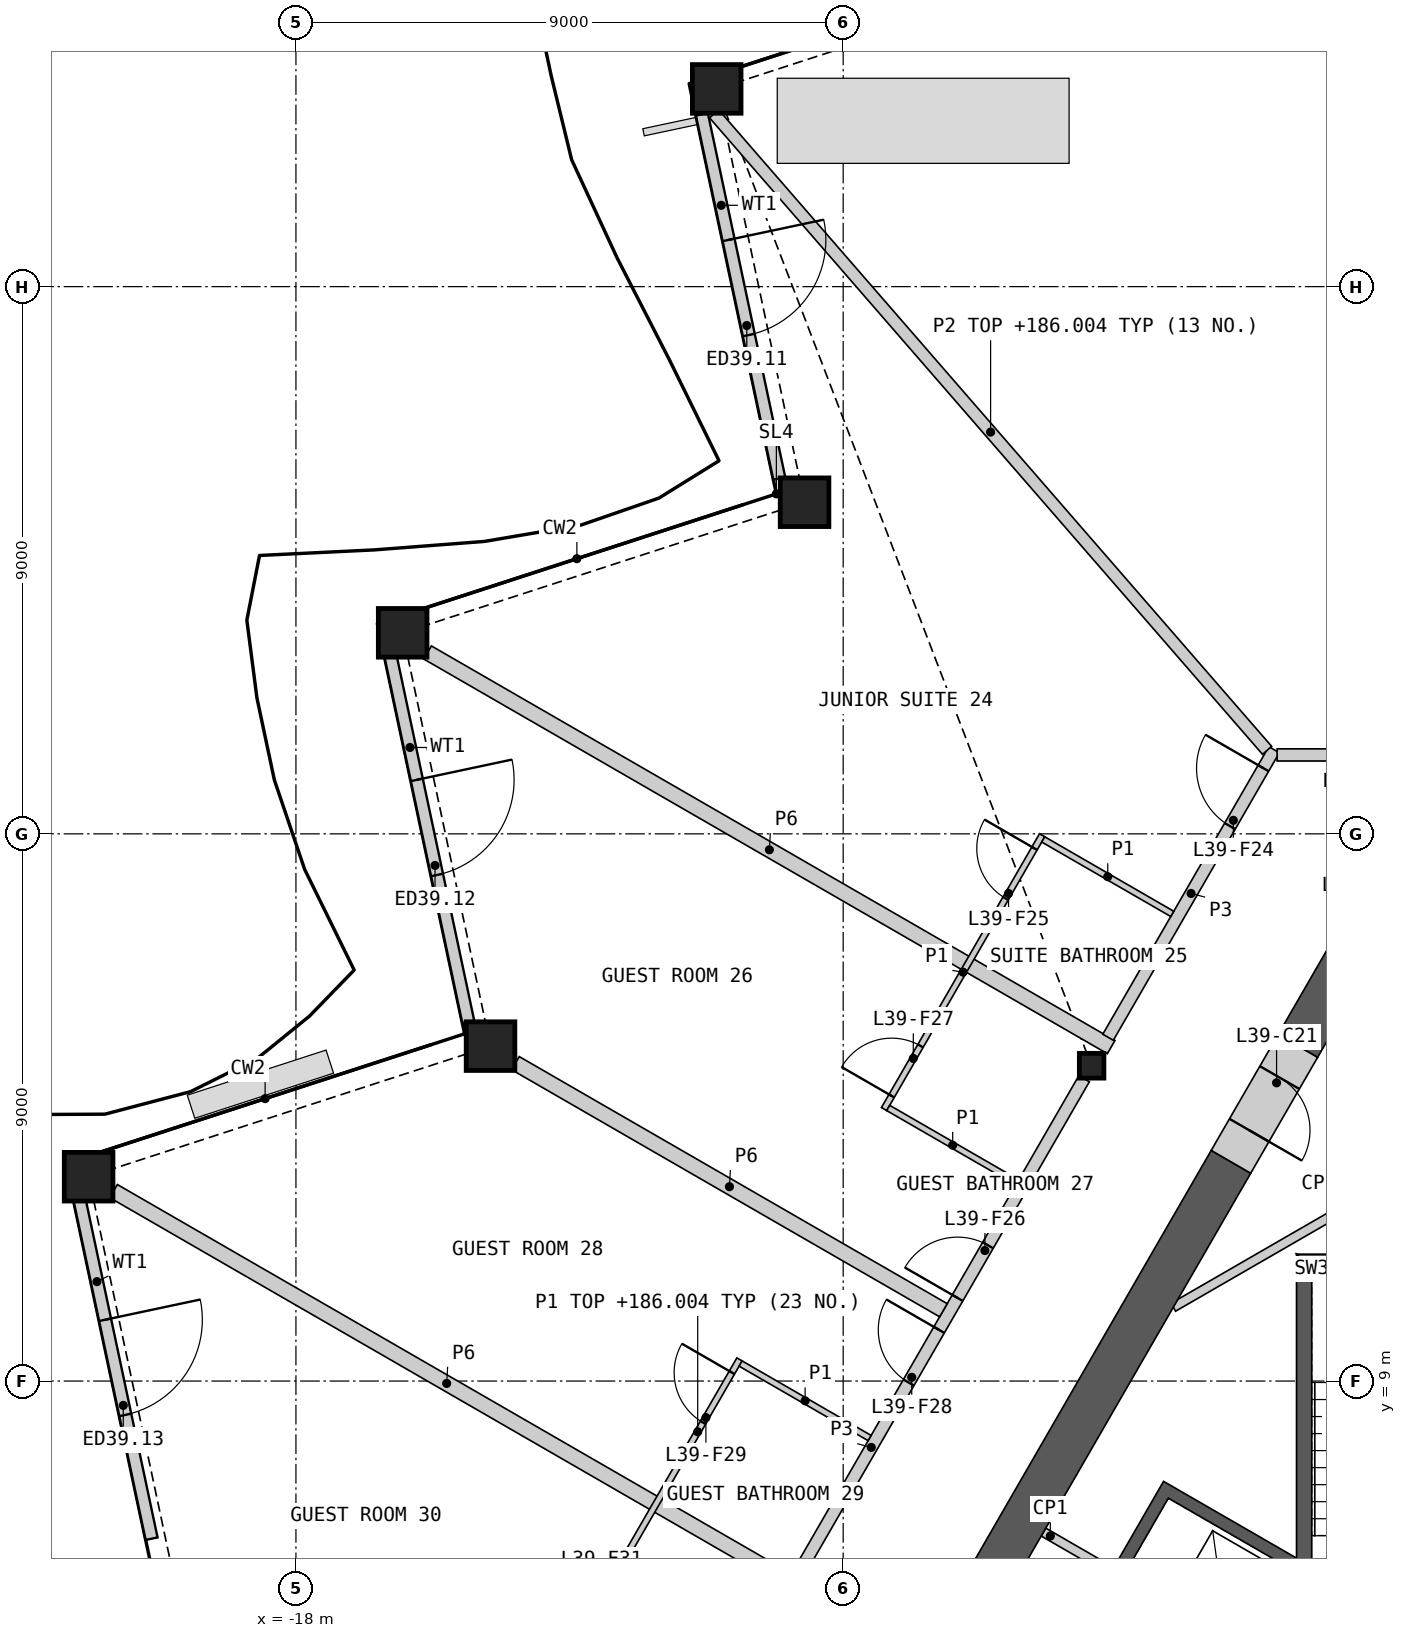
"""IFC4 building model, lengths in metres.
Left out: names, types, materials, properties, quantities, classifications, styles, units other than length and angle.
Written with IfcOpenShell. Run it as: python <this file> out.ifc"""

import sys

from ifc_helpers import new_model, si_unit, direction, frame, frame_2d, origin, origin_2d, place, context, subcontext, project, spatial, polyline, rectangle, hollow_rectangle, i_section, outline, extrude, element, fill, save


model = new_model("IFC4")
c1 = context("Model", 3, precision=1e-05, world=origin(), true_north=direction((0.0, 1.0)))
c2 = subcontext(c1, "Body", "Model", "MODEL_VIEW")
j1 = project(units=[si_unit("LENGTHUNIT", "METRE"), si_unit("PLANEANGLEUNIT", "RADIAN")], contexts=[c1])
p1 = place(None, origin())
s1 = spatial("IfcSite", under=j1, at=p1, CompositionType="ELEMENT")
p2 = place(p1, origin())
s2 = spatial("IfcBuilding", under=s1, at=p2, CompositionType="ELEMENT")
p3 = place(p2, frame((0.0, 0.0, 183.6)))
s3 = spatial("IfcBuildingStorey", under=s2, at=p3, CompositionType="ELEMENT", Elevation=183.6)
for number, where, z_axis, x_axis in (
    (1, (-11.08, 30.252, 0.0), (0.0, 0.0, 1.0), (1.0, 0.0, 0.0)),
    (2, (-9.635, 23.454, 0.0), (0.0, 0.0, 1.0), (1.0, 0.0, 0.0)),
    (3, (-16.245, 21.306, 0.0), (0.0, 0.0, 1.0), (1.0, 0.0, 0.0)),
    (4, (-14.8, 14.508, 0.0), (0.0, 0.0, 1.0), (1.0, 0.0, 0.0)),
    (5, (-21.409, 12.361, 0.0), (0.0, 0.0, 1.0), (1.0, 0.0, 0.0)),
):
    element("IfcColumn", number, at=place(p3, frame(where, z_axis=z_axis, x_axis=x_axis)), inside=s3, PredefinedType="COLUMN", context=c2, shape_type="SweptSolid", body=[
        extrude(hollow_rectangle(XDim=0.8, YDim=0.8, WallThickness=0.05, at=origin_2d()), origin(), (0.0, 0.0, 1.0), 3.6),
    ])
p4 = place(p3, frame((-4.914, 14.186, 0.0), z_axis=(0.0, 0.0, 1.0), x_axis=(1.0, 0.0, 0.0)))
e6 = element("IfcColumn", 6, at=p4, inside=s3, PredefinedType="COLUMN", context=c2, shape_type="SweptSolid", body=[
    extrude(i_section(OverallWidth=0.404, OverallDepth=0.407, WebThickness=0.027, FlangeThickness=0.044, at=origin_2d()), origin(), (0.0, 0.0, 1.0), 3.6),
])
p5 = place(p3, frame((-11.324, 29.835, 0.0), z_axis=(0.0, 0.0, 1.0), x_axis=(0.207925037413, -0.978144763732, 0.0)))
e7 = element("IfcWall", 7, at=p5, inside=s3, PredefinedType="SOLIDWALL", context=c2, shape_type="SweptSolid", body=[
    extrude(rectangle(XDim=6.123, YDim=0.2, at=frame_2d((3.062, 0.0))), origin(), (0.0, 0.0, 1.0), 2.701),
])
p6 = place(p5, frame((2.113, 0.0, 0.0)))
e8 = element("IfcOpeningElement", 8, at=p6, cuts=e7, PredefinedType="OPENING", context=c2, shape_type="SweptSolid", body=[
    extrude(rectangle(XDim=1.6, YDim=2.4, at=frame_2d((0.8, 1.2))), frame((0.0, 0.11, 0.0), z_axis=(0.0, -1.0, 0.0), x_axis=(1.0, 0.0, 0.0)), (0.0, 0.0, 1.0), 0.22),
])
p7 = place(p3, frame((-16.445, 20.925, 0.0), z_axis=(0.0, 0.0, 1.0), x_axis=(0.20791050027, -0.978147853792, 0.0)))
e9 = element("IfcWall", 9, at=p7, inside=s3, PredefinedType="SOLIDWALL", context=c2, shape_type="SweptSolid", body=[
    extrude(rectangle(XDim=6.151, YDim=0.2, at=frame_2d((3.075, 0.0))), origin(), (0.0, 0.0, 1.0), 2.701),
])
p8 = place(p7, frame((2.082, 0.0, 0.0)))
e10 = element("IfcOpeningElement", 10, at=p8, cuts=e9, PredefinedType="OPENING", context=c2, shape_type="SweptSolid", body=[
    extrude(rectangle(XDim=1.6, YDim=2.4, at=frame_2d((0.8, 1.2))), frame((0.0, 0.11, 0.0), z_axis=(0.0, -1.0, 0.0), x_axis=(1.0, 0.0, 0.0)), (0.0, 0.0, 1.0), 0.22),
])
p9 = place(p3, frame((-21.572, 12.044, 0.0), z_axis=(0.0, 0.0, 1.0), x_axis=(0.207914487103, -0.978147006361, 0.0)))
e11 = element("IfcWall", 11, at=p9, inside=s3, PredefinedType="SOLIDWALL", context=c2, shape_type="SweptSolid", body=[
    extrude(rectangle(XDim=5.763, YDim=0.2, at=frame_2d((2.882, 0.0))), origin(), (0.0, 0.0, 1.0), 2.701),
])
p10 = place(p9, frame((2.082, 0.0, 0.0)))
e12 = element("IfcOpeningElement", 12, at=p10, cuts=e11, PredefinedType="OPENING", context=c2, shape_type="SweptSolid", body=[
    extrude(rectangle(XDim=1.6, YDim=2.4, at=frame_2d((0.8, 1.2))), frame((0.0, 0.11, 0.0), z_axis=(0.0, -1.0, 0.0), x_axis=(1.0, 0.0, 0.0)), (0.0, 0.0, 1.0), 0.22),
])
p11 = place(p3, origin())
e13 = element("IfcWall", 13, at=p11, inside=s3, PredefinedType="SHEAR", context=c2, shape_type="SweptSolid", body=[
    extrude(outline(polyline([(-4.96, 0.208), (-7.131, 1.461), (-3.731, 7.35), (-1.561, 6.097), (-1.66, 5.924), (-3.652, 7.074), (-4.652, 5.342), (-2.66, 4.192), (-2.76, 4.019), (-4.752, 5.169), (-5.752, 3.437), (-3.76, 2.287), (-3.861, 2.113), (-5.852, 3.263), (-6.852, 1.531), (-4.861, 0.381), (-4.96, 0.208)])), origin(), (0.0, 0.0, 1.0), 3.25),
])
p12 = place(p3, origin())
e14 = element("IfcWall", 14, at=p12, inside=s3, PredefinedType="SHEAR", context=c2, shape_type="SweptSolid", body=[
    extrude(outline(polyline([(1.544, 11.087), (-1.544, 11.087), (-1.294, 10.837), (1.294, 10.837), (1.544, 11.087)])), origin(), (0.0, 0.0, 1.0), 3.25),
])
p13 = place(p3, origin())
e15 = element("IfcWall", 15, at=p13, inside=s3, PredefinedType="SHEAR", context=c2, shape_type="SweptSolid", body=[
    extrude(outline(polyline([(-1.294, 10.837), (-1.544, 11.087), (-1.544, 5.237), (-1.294, 5.237), (-1.294, 10.837)])), origin(), (0.0, 0.0, 1.0), 3.25),
])
p14 = place(p3, frame((-5.705, 6.516, 0.0), z_axis=(0.0, 0.0, 1.0), x_axis=(0.866003189247, -0.500038474733, 0.0)))
e16 = element("IfcWall", 16, at=p14, inside=s3, PredefinedType="PARTITIONING", context=c2, shape_type="SweptSolid", body=[
    extrude(rectangle(XDim=1.293, YDim=0.15, at=frame_2d((0.646, 0.0))), origin(), (0.0, 0.0, 1.0), 3.25),
])
p15 = place(p3, frame((1.785, 13.306, 0.0), z_axis=(0.0, 0.0, 1.0), x_axis=(-0.866038319186, -0.499977629202, 0.0)))
e17 = element("IfcWall", 17, at=p15, inside=s3, PredefinedType="PARTITIONING", context=c2, shape_type="SweptSolid", body=[
    extrude(rectangle(XDim=6.184, YDim=0.15, at=frame_2d((3.092, 0.0))), origin(), (0.0, 0.0, 1.0), 3.25),
])
p16 = place(p3, frame((-2.622, 12.606, 0.0), z_axis=(0.0, 0.0, 1.0), x_axis=(-0.500014611105, -0.866016967894, 0.0)))
e18 = element("IfcWall", 18, at=p16, inside=s3, PredefinedType="SHEAR", context=c2, shape_type="SweptSolid", body=[
    extrude(rectangle(XDim=8.198, YDim=0.75, at=frame_2d((4.099, 0.0))), origin(), (0.0, 0.0, 1.0), 3.25),
])
p17 = place(p3, frame((-0.325, 16.585, 0.0), z_axis=(0.0, 0.0, 1.0), x_axis=(-0.500019473932, -0.866014160212, 0.0)))
e19 = element("IfcWall", 19, at=p17, inside=s3, PredefinedType="SHEAR", context=c2, shape_type="SweptSolid", body=[
    extrude(rectangle(XDim=2.396, YDim=0.75, at=frame_2d((1.198, 0.0))), origin(), (0.0, 0.0, 1.0), 3.25),
])
p18 = place(p3, frame((-1.522, 14.511, 0.0), z_axis=(0.0, 0.0, 1.0), x_axis=(-0.499946605688, -0.86605622881, 0.0)))
e20 = element("IfcWall", 20, at=p18, inside=s3, PredefinedType="SHEAR", context=c2, shape_type="SweptSolid", body=[
    extrude(rectangle(XDim=2.2, YDim=0.75, at=frame_2d((1.1, 0.0))), origin(), (0.0, 0.0, 1.0), 3.25),
])
p19 = place(p18, frame((0.6, 0.0, 0.0)))
e21 = element("IfcOpeningElement", 21, at=p19, cuts=e20, PredefinedType="OPENING", context=c2, shape_type="SweptSolid", body=[
    extrude(rectangle(XDim=1.0, YDim=2.1, at=frame_2d((0.5, 1.05))), frame((0.0, 0.385, 0.0), z_axis=(0.0, -1.0, 0.0), x_axis=(1.0, 0.0, 0.0)), (0.0, 0.0, 1.0), 0.77),
])
p20 = place(p3, frame((-15.835, 20.983, 0.0), z_axis=(0.0, 0.0, 1.0), x_axis=(0.866022720283, -0.500004647933, 0.0)))
e22 = element("IfcWall", 22, at=p20, inside=s3, PredefinedType="PARTITIONING", context=c2, shape_type="SweptSolid", body=[
    extrude(rectangle(XDim=12.981, YDim=0.25, at=frame_2d((6.49, 0.0))), origin(), (0.0, 0.0, 1.0), 2.404),
])
p21 = place(p3, frame((-21.0, 12.124, 0.0), z_axis=(0.0, 0.0, 1.0), x_axis=(0.866025883649, -0.499999168849, 0.0)))
e23 = element("IfcWall", 23, at=p21, inside=s3, PredefinedType="PARTITIONING", context=c2, shape_type="SweptSolid", body=[
    extrude(rectangle(XDim=12.652, YDim=0.25, at=frame_2d((6.326, 0.0))), origin(), (0.0, 0.0, 1.0), 2.404),
])
p22 = place(p3, frame((-9.705, 5.888, 0.0), z_axis=(0.0, 0.0, 1.0), x_axis=(0.50000393355, 0.866023132736, 0.0)))
e24 = element("IfcWall", 24, at=p22, inside=s3, PredefinedType="PARTITIONING", context=c2, shape_type="SweptSolid", body=[
    extrude(rectangle(XDim=9.335, YDim=0.2, at=frame_2d((4.667, 0.0))), origin(), (0.0, 0.0, 1.0), 3.25),
])
p23 = place(p22, frame((5.172, 0.0, 0.0)))
e25 = element("IfcOpeningElement", 25, at=p23, cuts=e24, PredefinedType="OPENING", context=c2, shape_type="SweptSolid", body=[
    extrude(rectangle(XDim=1.0, YDim=2.1, at=frame_2d((0.5, 1.05))), frame((0.0, 0.11, 0.0), z_axis=(0.0, -1.0, 0.0), x_axis=(1.0, 0.0, 0.0)), (0.0, 0.0, 1.0), 0.22),
])
p24 = place(p22, frame((3.565, 0.0, 0.0)))
e26 = element("IfcOpeningElement", 26, at=p24, cuts=e24, PredefinedType="OPENING", context=c2, shape_type="SweptSolid", body=[
    extrude(rectangle(XDim=1.0, YDim=2.1, at=frame_2d((0.5, 1.05))), frame((0.0, 0.11, 0.0), z_axis=(0.0, -1.0, 0.0), x_axis=(1.0, 0.0, 0.0)), (0.0, 0.0, 1.0), 0.22),
])
p25 = place(p3, frame((-14.39, 14.228, 0.0), z_axis=(0.0, 0.0, 1.0), x_axis=(0.866031008936, -0.499990291468, 0.0)))
e27 = element("IfcWall", 27, at=p25, inside=s3, PredefinedType="PARTITIONING", context=c2, shape_type="SweptSolid", body=[
    extrude(rectangle(XDim=8.127, YDim=0.25, at=frame_2d((4.063, 0.0))), origin(), (0.0, 0.0, 1.0), 2.404),
])
p26 = place(p3, frame((-4.644, 14.655, 0.0), z_axis=(0.0, 0.0, 1.0), x_axis=(0.49998041698, 0.866036709751, 0.0)))
e28 = element("IfcWall", 28, at=p26, inside=s3, PredefinedType="PARTITIONING", context=c2, shape_type="SweptSolid", body=[
    extrude(rectangle(XDim=5.462, YDim=0.2, at=frame_2d((2.731, 0.0))), origin(), (0.0, 0.0, 1.0), 3.25),
])
p27 = place(p26, frame((4.01, 0.0, 0.0)))
e29 = element("IfcOpeningElement", 29, at=p27, cuts=e28, PredefinedType="OPENING", context=c2, shape_type="SweptSolid", body=[
    extrude(rectangle(XDim=1.1, YDim=2.1, at=frame_2d((0.55, 1.05))), frame((0.0, 0.11, 0.0), z_axis=(0.0, -1.0, 0.0), x_axis=(1.0, 0.0, 0.0)), (0.0, 0.0, 1.0), 0.22),
])
p28 = place(p3, frame((-1.863, 19.298, 0.0), z_axis=(0.0, 0.0, 1.0), x_axis=(1.0, 0.0, 0.0)))
e30 = element("IfcWall", 30, at=p28, inside=s3, PredefinedType="PARTITIONING", context=c2, shape_type="SweptSolid", body=[
    extrude(rectangle(XDim=3.826, YDim=0.2, at=frame_2d((1.913, 0.0))), origin(), (0.0, 0.0, 1.0), 3.25),
])
p29 = place(p28, frame((0.962, 0.0, 0.0)))
e31 = element("IfcOpeningElement", 31, at=p29, cuts=e30, PredefinedType="OPENING", context=c2, shape_type="SweptSolid", body=[
    extrude(rectangle(XDim=1.8, YDim=2.1, at=frame_2d((0.9, 1.05))), frame((0.0, 0.11, 0.0), z_axis=(0.0, -1.0, 0.0), x_axis=(1.0, 0.0, 0.0)), (0.0, 0.0, 1.0), 0.22),
])
p30 = place(p3, frame((-11.122, 29.842, 0.0), z_axis=(0.0, 0.0, 1.0), x_axis=(0.65579678992, -0.754937461205, 0.0)))
e32 = element("IfcWall", 32, at=p30, inside=s3, PredefinedType="PARTITIONING", context=c2, shape_type="SweptSolid", body=[
    extrude(rectangle(XDim=13.867, YDim=0.2, at=frame_2d((6.933, 0.0))), origin(), (0.0, 0.0, 1.0), 2.404),
])
p31 = place(p3, frame((-13.455, 4.593, 0.0), z_axis=(0.0, 0.0, 1.0), x_axis=(0.500015767406, 0.866016300277, 0.0)))
e33 = element("IfcWall", 33, at=p31, inside=s3, PredefinedType="PARTITIONING", context=c2, shape_type="SweptSolid", body=[
    extrude(rectangle(XDim=5.5, YDim=0.1, at=frame_2d((2.75, 0.0))), origin(), (0.0, 0.0, 1.0), 2.404),
])
p32 = place(p31, frame((4.3, 0.0, 0.0)))
e34 = element("IfcOpeningElement", 34, at=p32, cuts=e33, PredefinedType="OPENING", context=c2, shape_type="SweptSolid", body=[
    extrude(rectangle(XDim=0.95, YDim=2.1, at=frame_2d((0.475, 1.05))), frame((0.0, 0.06, 0.0), z_axis=(0.0, -1.0, 0.0), x_axis=(1.0, 0.0, 0.0)), (0.0, 0.0, 1.0), 0.12),
])
p33 = place(p31, frame((0.25, 0.0, 0.0)))
e35 = element("IfcOpeningElement", 35, at=p33, cuts=e33, PredefinedType="OPENING", context=c2, shape_type="SweptSolid", body=[
    extrude(rectangle(XDim=0.95, YDim=2.1, at=frame_2d((0.475, 1.05))), frame((0.0, 0.06, 0.0), z_axis=(0.0, -1.0, 0.0), x_axis=(1.0, 0.0, 0.0)), (0.0, 0.0, 1.0), 0.12),
])
p34 = place(p3, frame((-8.328, 13.473, 0.0), z_axis=(0.0, 0.0, 1.0), x_axis=(0.499992051641, 0.866029992723, 0.0)))
e36 = element("IfcWall", 36, at=p34, inside=s3, PredefinedType="PARTITIONING", context=c2, shape_type="SweptSolid", body=[
    extrude(rectangle(XDim=5.2, YDim=0.1, at=frame_2d((2.6, 0.0))), origin(), (0.0, 0.0, 1.0), 2.404),
])
p35 = place(p34, frame((4.0, 0.0, 0.0)))
e37 = element("IfcOpeningElement", 37, at=p35, cuts=e36, PredefinedType="OPENING", context=c2, shape_type="SweptSolid", body=[
    extrude(rectangle(XDim=0.95, YDim=2.1, at=frame_2d((0.475, 1.05))), frame((0.0, 0.06, 0.0), z_axis=(0.0, -1.0, 0.0), x_axis=(1.0, 0.0, 0.0)), (0.0, 0.0, 1.0), 0.12),
])
p36 = place(p34, frame((0.25, 0.0, 0.0)))
e38 = element("IfcOpeningElement", 38, at=p36, cuts=e36, PredefinedType="OPENING", context=c2, shape_type="SweptSolid", body=[
    extrude(rectangle(XDim=0.95, YDim=2.1, at=frame_2d((0.475, 1.05))), frame((0.0, 0.06, 0.0), z_axis=(0.0, -1.0, 0.0), x_axis=(1.0, 0.0, 0.0)), (0.0, 0.0, 1.0), 0.12),
])
p37 = place(p3, frame((-5.71, 17.908, 0.0), z_axis=(0.0, 0.0, 1.0), x_axis=(0.866057815567, -0.499943856944, 0.0)))
e39 = element("IfcWall", 39, at=p37, inside=s3, PredefinedType="PARTITIONING", context=c2, shape_type="SweptSolid", body=[
    extrude(rectangle(XDim=2.45, YDim=0.1, at=frame_2d((1.225, 0.0))), origin(), (0.0, 0.0, 1.0), 2.404),
])
p38 = place(p3, frame((-8.26, 13.492, 0.0), z_axis=(0.0, 0.0, 1.0), x_axis=(0.866014668023, -0.500018594424, 0.0)))
e40 = element("IfcWall", 40, at=p38, inside=s3, PredefinedType="PARTITIONING", context=c2, shape_type="SweptSolid", body=[
    extrude(rectangle(XDim=2.45, YDim=0.1, at=frame_2d((1.225, 0.0))), origin(), (0.0, 0.0, 1.0), 2.404),
])
p39 = place(p3, frame((-10.687, 9.288, 0.0), z_axis=(0.0, 0.0, 1.0), x_axis=(0.866032905446, -0.499987006516, 0.0)))
e41 = element("IfcWall", 41, at=p39, inside=s3, PredefinedType="PARTITIONING", context=c2, shape_type="SweptSolid", body=[
    extrude(rectangle(XDim=2.45, YDim=0.1, at=frame_2d((1.225, 0.0))), origin(), (0.0, 0.0, 1.0), 2.404),
])
p40 = place(p6, origin())
e42 = element("IfcDoor", 42, at=p40, inside=s3, OperationType="DOUBLE_DOOR_SINGLE_SWING", PredefinedType="DOOR", context=c2, shape_type="SweptSolid", body=[
    extrude(rectangle(XDim=1.6, YDim=2.4, at=frame_2d((0.8, 1.2))), frame((0.0, 0.025, 0.0), z_axis=(0.0, -1.0, 0.0), x_axis=(1.0, 0.0, 0.0)), (0.0, 0.0, 1.0), 0.05),
])
fill(e8, e42)
p41 = place(p8, origin())
e43 = element("IfcDoor", 43, at=p41, inside=s3, OperationType="DOUBLE_DOOR_SINGLE_SWING", PredefinedType="DOOR", context=c2, shape_type="SweptSolid", body=[
    extrude(rectangle(XDim=1.6, YDim=2.4, at=frame_2d((0.8, 1.2))), frame((0.0, 0.025, 0.0), z_axis=(0.0, -1.0, 0.0), x_axis=(1.0, 0.0, 0.0)), (0.0, 0.0, 1.0), 0.05),
])
fill(e10, e43)
p42 = place(p10, origin())
e44 = element("IfcDoor", 44, at=p42, inside=s3, OperationType="DOUBLE_DOOR_SINGLE_SWING", PredefinedType="DOOR", context=c2, shape_type="SweptSolid", body=[
    extrude(rectangle(XDim=1.6, YDim=2.4, at=frame_2d((0.8, 1.2))), frame((0.0, 0.025, 0.0), z_axis=(0.0, -1.0, 0.0), x_axis=(1.0, 0.0, 0.0)), (0.0, 0.0, 1.0), 0.05),
])
fill(e12, e44)
p43 = place(p19, origin())
e45 = element("IfcDoor", 45, at=p43, inside=s3, OperationType="SINGLE_SWING_RIGHT", PredefinedType="DOOR", context=c2, shape_type="SweptSolid", body=[
    extrude(rectangle(XDim=1.0, YDim=2.1, at=frame_2d((0.5, 1.05))), frame((0.0, 0.13, 0.0), z_axis=(0.0, -1.0, 0.0), x_axis=(1.0, 0.0, 0.0)), (0.0, 0.0, 1.0), 0.05),
])
fill(e21, e45)
p44 = place(p27, origin())
e46 = element("IfcDoor", 46, at=p44, inside=s3, OperationType="SINGLE_SWING_RIGHT", PredefinedType="DOOR", context=c2, shape_type="SweptSolid", body=[
    extrude(rectangle(XDim=1.1, YDim=2.1, at=frame_2d((0.55, 1.05))), frame((0.0, 0.025, 0.0), z_axis=(0.0, -1.0, 0.0), x_axis=(1.0, 0.0, 0.0)), (0.0, 0.0, 1.0), 0.05),
])
fill(e29, e46)
p45 = place(p35, origin())
e47 = element("IfcDoor", 47, at=p45, inside=s3, OperationType="SINGLE_SWING_RIGHT", PredefinedType="DOOR", context=c2, shape_type="SweptSolid", body=[
    extrude(rectangle(XDim=0.95, YDim=2.1, at=frame_2d((0.475, 1.05))), frame((0.0, 0.025, 0.0), z_axis=(0.0, -1.0, 0.0), x_axis=(1.0, 0.0, 0.0)), (0.0, 0.0, 1.0), 0.05),
])
fill(e37, e47)
p46 = place(p23, origin())
e48 = element("IfcDoor", 48, at=p46, inside=s3, OperationType="SINGLE_SWING_LEFT", PredefinedType="DOOR", context=c2, shape_type="SweptSolid", body=[
    extrude(rectangle(XDim=1.0, YDim=2.1, at=frame_2d((0.5, 1.05))), frame((0.0, 0.025, 0.0), z_axis=(0.0, -1.0, 0.0), x_axis=(1.0, 0.0, 0.0)), (0.0, 0.0, 1.0), 0.05),
])
fill(e25, e48)
p47 = place(p36, origin())
e49 = element("IfcDoor", 49, at=p47, inside=s3, OperationType="SINGLE_SWING_LEFT", PredefinedType="DOOR", context=c2, shape_type="SweptSolid", body=[
    extrude(rectangle(XDim=0.95, YDim=2.1, at=frame_2d((0.475, 1.05))), frame((0.0, 0.025, 0.0), z_axis=(0.0, -1.0, 0.0), x_axis=(1.0, 0.0, 0.0)), (0.0, 0.0, 1.0), 0.05),
])
fill(e38, e49)
p48 = place(p24, origin())
e50 = element("IfcDoor", 50, at=p48, inside=s3, OperationType="SINGLE_SWING_RIGHT", PredefinedType="DOOR", context=c2, shape_type="SweptSolid", body=[
    extrude(rectangle(XDim=1.0, YDim=2.1, at=frame_2d((0.5, 1.05))), frame((0.0, 0.025, 0.0), z_axis=(0.0, -1.0, 0.0), x_axis=(1.0, 0.0, 0.0)), (0.0, 0.0, 1.0), 0.05),
])
fill(e26, e50)
p49 = place(p32, origin())
e51 = element("IfcDoor", 51, at=p49, inside=s3, OperationType="SINGLE_SWING_RIGHT", PredefinedType="DOOR", context=c2, shape_type="SweptSolid", body=[
    extrude(rectangle(XDim=0.95, YDim=2.1, at=frame_2d((0.475, 1.05))), frame((0.0, 0.025, 0.0), z_axis=(0.0, -1.0, 0.0), x_axis=(1.0, 0.0, 0.0)), (0.0, 0.0, 1.0), 0.05),
])
fill(e34, e51)
save(model, sys.argv[1])
